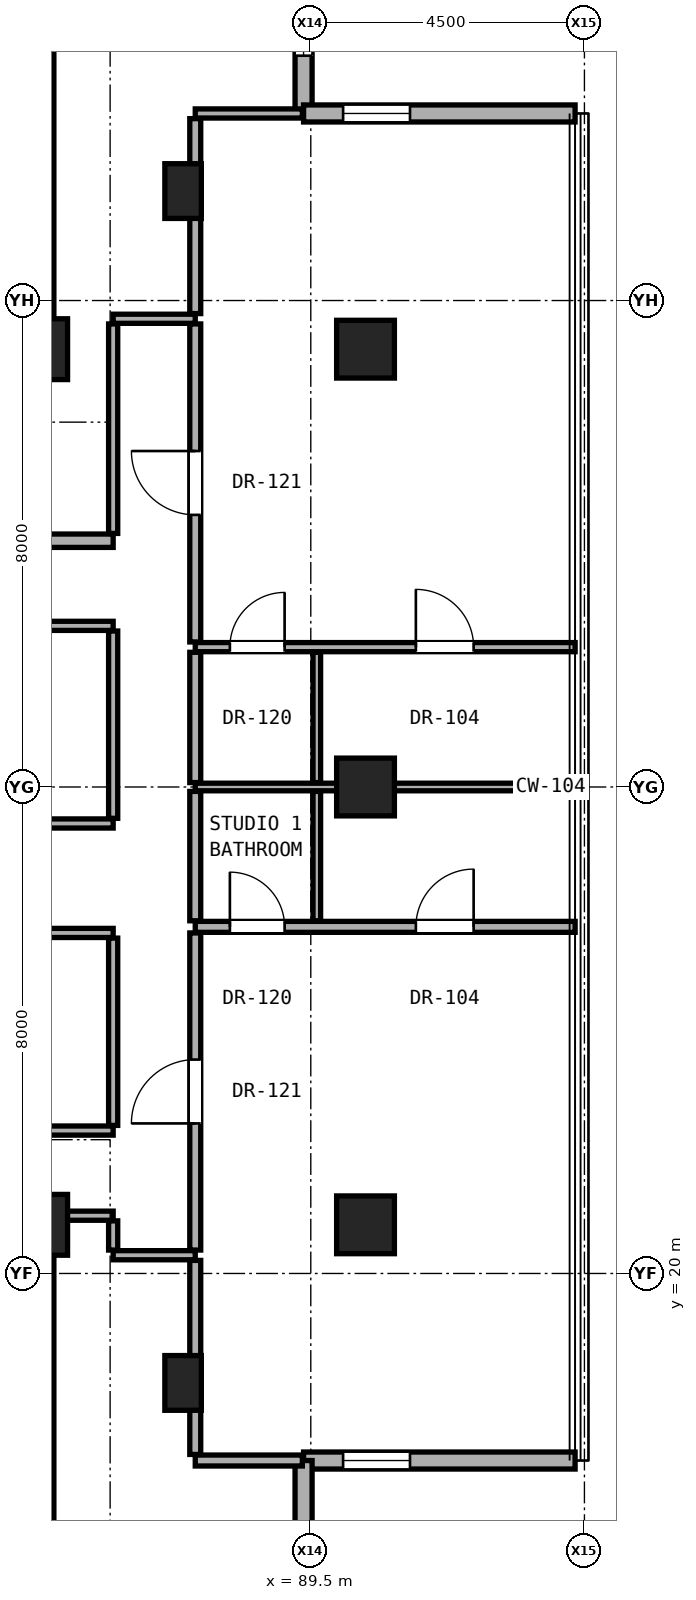
"""IFC4 building model, lengths in metres.
Left out: names, types, materials, properties, quantities, classifications, styles, units other than length and angle.
Written with IfcOpenShell. Run it as: python <this file> out.ifc"""

import sys

from ifc_helpers import new_model, si_unit, direction, frame, frame_2d, origin, origin_2d, place, context, subcontext, project, spatial, rectangle, hollow_rectangle, extrude, element, fill, save


model = new_model("IFC4")
c1 = context("Model", 3, precision=1e-05, world=origin(), true_north=direction((0.0, 1.0)))
c2 = subcontext(c1, "Body", "Model", "MODEL_VIEW")
j1 = project(units=[si_unit("LENGTHUNIT", "METRE"), si_unit("PLANEANGLEUNIT", "RADIAN")], contexts=[c1])
p1 = place(None, origin())
s1 = spatial("IfcSite", under=j1, at=p1, CompositionType="ELEMENT")
p2 = place(p1, origin())
s2 = spatial("IfcBuilding", under=s1, at=p2, CompositionType="ELEMENT")
p3 = place(p2, frame((0.0, 0.0, 164.15)))
s3 = spatial("IfcBuildingStorey", under=s2, at=p3, CompositionType="ELEMENT", Elevation=164.15)
for number, where, z_axis, x_axis in (
    (1, (85.0, 20.8, 0.0), (0.0, 0.0, 1.0), (1.0, 0.0, 0.0)),
    (2, (85.0, 35.2, 0.0), (0.0, 0.0, 1.0), (1.0, 0.0, 0.0)),
):
    element("IfcColumn", number, at=place(p3, frame(where, z_axis=z_axis, x_axis=x_axis)), inside=s3, PredefinedType="COLUMN", context=c2, shape_type="SweptSolid", body=[
        extrude(rectangle(XDim=1.0, YDim=1.0, at=origin_2d()), origin(), (0.0, 0.0, 1.0), 3.25),
    ])
for number, where, z_axis, x_axis in (
    (3, (90.4, 20.8, 0.0), (0.0, 0.0, 1.0), (1.0, 0.0, 0.0)),
    (4, (90.4, 28.0, 0.0), (0.0, 0.0, 1.0), (1.0, 0.0, 0.0)),
    (5, (90.4, 35.2, 0.0), (0.0, 0.0, 1.0), (1.0, 0.0, 0.0)),
):
    element("IfcColumn", number, at=place(p3, frame(where, z_axis=z_axis, x_axis=x_axis)), inside=s3, PredefinedType="COLUMN", context=c2, shape_type="SweptSolid", body=[
        extrude(hollow_rectangle(XDim=0.95, YDim=0.95, WallThickness=0.05, at=origin_2d()), origin(), (0.0, 0.0, 1.0), 3.25),
    ])
for number, where, z_axis, x_axis in (
    (6, (87.4, 18.2, 0.0), (0.0, 0.0, 1.0), (1.0, 0.0, 0.0)),
    (7, (87.4, 37.8, 0.0), (0.0, 0.0, 1.0), (1.0, 0.0, 0.0)),
):
    element("IfcColumn", number, at=place(p3, frame(where, z_axis=z_axis, x_axis=x_axis)), inside=s3, PredefinedType="PILASTER", context=c2, shape_type="SweptSolid", body=[
        extrude(rectangle(XDim=0.6, YDim=0.9, at=origin_2d()), origin(), (0.0, 0.0, 1.0), 3.25),
    ])
for number, where, z_axis, x_axis in (
    (8, (85.0, 35.2, 0.0), (0.0, 0.0, 1.0), (0.0, 1.0, 0.0)),
    (9, (85.0, 15.2, 0.0), (0.0, 0.0, 1.0), (0.0, 1.0, 0.0)),
):
    element("IfcWall", number, at=place(p3, frame(where, z_axis=z_axis, x_axis=x_axis)), inside=s3, PredefinedType="SHEAR", context=c2, shape_type="SweptSolid", body=[
        extrude(rectangle(XDim=5.6, YDim=0.55, at=frame_2d((2.8, 0.0))), origin(), (0.0, 0.0, 1.0), 3.05),
    ])
p4 = place(p3, frame((89.381, 39.076, 0.0), z_axis=(0.0, 0.0, 1.0), x_axis=(0.0, 1.0, 0.0)))
e10 = element("IfcWall", 10, at=p4, inside=s3, PredefinedType="SOLIDWALL", context=c2, shape_type="SweptSolid", body=[
    extrude(rectangle(XDim=4.465, YDim=0.28, at=frame_2d((2.233, 0.0))), origin(), (0.0, 0.0, 1.0), 3.03),
])
p5 = place(p4, frame((0.95, 0.0, 0.85)))
e11 = element("IfcOpeningElement", 11, at=p5, cuts=e10, PredefinedType="OPENING", context=c2, shape_type="SweptSolid", body=[
    extrude(rectangle(XDim=1.1, YDim=2.0, at=frame_2d((0.55, 1.0))), frame((0.0, 0.15, 0.0), z_axis=(0.0, -1.0, 0.0), x_axis=(1.0, 0.0, 0.0)), (0.0, 0.0, 1.0), 0.3),
])
p6 = place(p3, frame((89.381, 16.924, 0.0), z_axis=(0.0, 0.0, 1.0), x_axis=(1.0, 0.0, 0.0)))
e12 = element("IfcWall", 12, at=p6, inside=s3, PredefinedType="SOLIDWALL", context=c2, shape_type="SweptSolid", body=[
    extrude(rectangle(XDim=4.465, YDim=0.28, at=frame_2d((2.232, 0.0))), origin(), (0.0, 0.0, 1.0), 3.03),
])
p7 = place(p6, frame((0.65, 0.0, 0.85)))
e13 = element("IfcOpeningElement", 13, at=p7, cuts=e12, PredefinedType="OPENING", context=c2, shape_type="SweptSolid", body=[
    extrude(rectangle(XDim=1.1, YDim=2.0, at=frame_2d((0.55, 1.0))), frame((0.0, 0.15, 0.0), z_axis=(0.0, -1.0, 0.0), x_axis=(1.0, 0.0, 0.0)), (0.0, 0.0, 1.0), 0.3),
])
p8 = place(p3, frame((89.381, 12.458, 0.0), z_axis=(0.0, 0.0, 1.0), x_axis=(0.0, 1.0, 0.0)))
e14 = element("IfcWall", 14, at=p8, inside=s3, PredefinedType="SOLIDWALL", context=c2, shape_type="SweptSolid", body=[
    extrude(rectangle(XDim=4.465, YDim=0.28, at=frame_2d((2.233, 0.0))), origin(), (0.0, 0.0, 1.0), 3.03),
])
p9 = place(p3, frame((93.846, 39.076, 0.0), z_axis=(0.0, 0.0, 1.0), x_axis=(-1.0, 0.0, 0.0)))
e15 = element("IfcWall", 15, at=p9, inside=s3, PredefinedType="SOLIDWALL", context=c2, shape_type="SweptSolid", body=[
    extrude(rectangle(XDim=4.465, YDim=0.28, at=frame_2d((2.232, 0.0))), origin(), (0.0, 0.0, 1.0), 3.03),
])
p10 = place(p9, frame((2.715, 0.0, 0.85)))
e16 = element("IfcOpeningElement", 16, at=p10, cuts=e15, PredefinedType="OPENING", context=c2, shape_type="SweptSolid", body=[
    extrude(rectangle(XDim=1.1, YDim=2.0, at=frame_2d((0.55, 1.0))), frame((0.0, 0.15, 0.0), z_axis=(0.0, -1.0, 0.0), x_axis=(1.0, 0.0, 0.0)), (0.0, 0.0, 1.0), 0.3),
])
p11 = place(p3, frame((87.6, 16.924, 0.0), z_axis=(0.0, 0.0, 1.0), x_axis=(1.0, 0.0, 0.0)))
e17 = element("IfcWall", 17, at=p11, inside=s3, PredefinedType="PARTITIONING", context=c2, shape_type="SweptSolid", body=[
    extrude(rectangle(XDim=1.761, YDim=0.18, at=frame_2d((0.881, 0.0))), origin(), (0.0, 0.0, 1.0), 3.05),
])
p12 = place(p3, frame((86.25, 20.3, 0.0), z_axis=(0.0, 0.0, 1.0), x_axis=(1.0, 0.0, 0.0)))
e18 = element("IfcWall", 18, at=p12, inside=s3, PredefinedType="PARTITIONING", context=c2, shape_type="SweptSolid", body=[
    extrude(rectangle(XDim=1.35, YDim=0.15, at=frame_2d((0.675, 0.0))), origin(), (0.0, 0.0, 1.0), 3.05),
])
p13 = place(p3, frame((85.27, 20.95, 0.0), z_axis=(0.0, 0.0, 1.0), x_axis=(1.0, 0.0, 0.0)))
e19 = element("IfcWall", 19, at=p13, inside=s3, PredefinedType="PARTITIONING", context=c2, shape_type="SweptSolid", body=[
    extrude(rectangle(XDim=0.98, YDim=0.15, at=frame_2d((0.49, 0.0))), origin(), (0.0, 0.0, 1.0), 2.442),
])
p14 = place(p3, frame((78.64, 22.35, 0.0), z_axis=(0.0, 0.0, 1.0), x_axis=(1.0, 0.0, 0.0)))
e20 = element("IfcWall", 20, at=p14, inside=s3, PredefinedType="PARTITIONING", context=c2, shape_type="SweptSolid", body=[
    extrude(rectangle(XDim=7.61, YDim=0.15, at=frame_2d((3.805, 0.0))), origin(), (0.0, 0.0, 1.0), 2.186),
])
p15 = place(p14, frame((3.33, 0.0, 0.0)))
e21 = element("IfcOpeningElement", 21, at=p15, cuts=e20, PredefinedType="OPENING", context=c2, shape_type="SweptSolid", body=[
    extrude(rectangle(XDim=0.95, YDim=2.15, at=frame_2d((0.475, 1.075))), frame((0.0, 0.085, 0.0), z_axis=(0.0, -1.0, 0.0), x_axis=(1.0, 0.0, 0.0)), (0.0, 0.0, 1.0), 0.17),
])
p16 = place(p3, frame((78.6, 25.6, 0.0), z_axis=(0.0, 0.0, 1.0), x_axis=(1.0, 0.0, 0.0)))
e22 = element("IfcWall", 22, at=p16, inside=s3, PredefinedType="PARTITIONING", context=c2, shape_type="SweptSolid", body=[
    extrude(rectangle(XDim=7.65, YDim=0.15, at=frame_2d((3.825, 0.0))), origin(), (0.0, 0.0, 1.0), 2.186),
])
p17 = place(p3, frame((87.6, 25.7, 0.0), z_axis=(0.0, 0.0, 1.0), x_axis=(1.0, 0.0, 0.0)))
e23 = element("IfcWall", 23, at=p17, inside=s3, PredefinedType="PARTITIONING", context=c2, shape_type="SweptSolid", body=[
    extrude(rectangle(XDim=6.247, YDim=0.18, at=frame_2d((3.124, 0.0))), origin(), (0.0, 0.0, 1.0), 2.269),
])
p18 = place(p17, frame((3.628, 0.0, 0.0)))
e24 = element("IfcOpeningElement", 24, at=p18, cuts=e23, PredefinedType="OPENING", context=c2, shape_type="SweptSolid", body=[
    extrude(rectangle(XDim=0.95, YDim=2.15, at=frame_2d((0.475, 1.075))), frame((0.0, 0.1, 0.0), z_axis=(0.0, -1.0, 0.0), x_axis=(1.0, 0.0, 0.0)), (0.0, 0.0, 1.0), 0.2),
])
p19 = place(p17, frame((0.57, 0.0, 0.0)))
e25 = element("IfcOpeningElement", 25, at=p19, cuts=e23, PredefinedType="OPENING", context=c2, shape_type="SweptSolid", body=[
    extrude(rectangle(XDim=0.9, YDim=2.1, at=frame_2d((0.45, 1.05))), frame((0.0, 0.1, 0.0), z_axis=(0.0, -1.0, 0.0), x_axis=(1.0, 0.0, 0.0)), (0.0, 0.0, 1.0), 0.2),
])
p20 = place(p3, frame((78.6, 27.4, 0.0), z_axis=(0.0, 0.0, 1.0), x_axis=(1.0, 0.0, 0.0)))
e26 = element("IfcWall", 26, at=p20, inside=s3, PredefinedType="PARTITIONING", context=c2, shape_type="SweptSolid", body=[
    extrude(rectangle(XDim=7.65, YDim=0.15, at=frame_2d((3.825, 0.0))), origin(), (0.0, 0.0, 1.0), 2.186),
])
p21 = place(p3, frame((87.6, 28.0, 0.0), z_axis=(0.0, 0.0, 1.0), x_axis=(1.0, 0.0, 0.0)))
e27 = element("IfcWall", 27, at=p21, inside=s3, PredefinedType="PARTITIONING", context=c2, shape_type="SweptSolid", body=[
    extrude(rectangle(XDim=6.247, YDim=0.125, at=frame_2d((3.124, 0.0))), origin(), (0.0, 0.0, 1.0), 2.269),
])
p22 = place(p3, frame((87.6, 30.3, 0.0), z_axis=(0.0, 0.0, 1.0), x_axis=(1.0, 0.0, 0.0)))
e28 = element("IfcWall", 28, at=p22, inside=s3, PredefinedType="PARTITIONING", context=c2, shape_type="SweptSolid", body=[
    extrude(rectangle(XDim=6.247, YDim=0.15, at=frame_2d((3.124, 0.0))), origin(), (0.0, 0.0, 1.0), 2.269),
])
p23 = place(p22, frame((3.628, 0.0, 0.0)))
e29 = element("IfcOpeningElement", 29, at=p23, cuts=e28, PredefinedType="OPENING", context=c2, shape_type="SweptSolid", body=[
    extrude(rectangle(XDim=0.95, YDim=2.15, at=frame_2d((0.475, 1.075))), frame((0.0, 0.085, 0.0), z_axis=(0.0, -1.0, 0.0), x_axis=(1.0, 0.0, 0.0)), (0.0, 0.0, 1.0), 0.17),
])
p24 = place(p22, frame((0.57, 0.0, 0.0)))
e30 = element("IfcOpeningElement", 30, at=p24, cuts=e28, PredefinedType="OPENING", context=c2, shape_type="SweptSolid", body=[
    extrude(rectangle(XDim=0.9, YDim=2.1, at=frame_2d((0.45, 1.05))), frame((0.0, 0.085, 0.0), z_axis=(0.0, -1.0, 0.0), x_axis=(1.0, 0.0, 0.0)), (0.0, 0.0, 1.0), 0.17),
])
p25 = place(p3, frame((78.64, 30.65, 0.0), z_axis=(0.0, 0.0, 1.0), x_axis=(1.0, 0.0, 0.0)))
e31 = element("IfcWall", 31, at=p25, inside=s3, PredefinedType="PARTITIONING", context=c2, shape_type="SweptSolid", body=[
    extrude(rectangle(XDim=7.61, YDim=0.15, at=frame_2d((3.805, 0.0))), origin(), (0.0, 0.0, 1.0), 2.186),
])
p26 = place(p25, frame((3.33, 0.0, 0.0)))
e32 = element("IfcOpeningElement", 32, at=p26, cuts=e31, PredefinedType="OPENING", context=c2, shape_type="SweptSolid", body=[
    extrude(rectangle(XDim=0.95, YDim=2.15, at=frame_2d((0.475, 1.075))), frame((0.0, 0.085, 0.0), z_axis=(0.0, -1.0, 0.0), x_axis=(1.0, 0.0, 0.0)), (0.0, 0.0, 1.0), 0.17),
])
p27 = place(p3, frame((71.55, 32.05, 0.0), z_axis=(0.0, 0.0, 1.0), x_axis=(1.0, 0.0, 0.0)))
e33 = element("IfcWall", 33, at=p27, inside=s3, PredefinedType="SOLIDWALL", context=c2, shape_type="SweptSolid", body=[
    extrude(rectangle(XDim=14.7, YDim=0.22, at=frame_2d((7.35, 0.0))), origin(), (0.0, 0.0, 1.0), 2.186),
])
p28 = place(p27, frame((6.065, 0.0, 0.0)))
e34 = element("IfcOpeningElement", 34, at=p28, cuts=e33, PredefinedType="OPENING", context=c2, shape_type="SweptSolid", body=[
    extrude(rectangle(XDim=0.85, YDim=2.01, at=frame_2d((0.425, 1.005))), frame((0.0, 0.12, 0.0), z_axis=(0.0, -1.0, 0.0), x_axis=(1.0, 0.0, 0.0)), (0.0, 0.0, 1.0), 0.24),
])
p29 = place(p27, frame((10.535, 0.0, 0.0)))
e35 = element("IfcOpeningElement", 35, at=p29, cuts=e33, PredefinedType="OPENING", context=c2, shape_type="SweptSolid", body=[
    extrude(rectangle(XDim=0.95, YDim=2.15, at=frame_2d((0.475, 1.075))), frame((0.0, 0.12, 0.0), z_axis=(0.0, -1.0, 0.0), x_axis=(1.0, 0.0, 0.0)), (0.0, 0.0, 1.0), 0.24),
])
p30 = place(p27, frame((0.7, 0.0, 0.0)))
e36 = element("IfcOpeningElement", 36, at=p30, cuts=e33, PredefinedType="OPENING", context=c2, shape_type="SweptSolid", body=[
    extrude(rectangle(XDim=0.85, YDim=2.01, at=frame_2d((0.425, 1.005))), frame((0.0, 0.12, 0.0), z_axis=(0.0, -1.0, 0.0), x_axis=(1.0, 0.0, 0.0)), (0.0, 0.0, 1.0), 0.24),
])
p31 = place(p27, frame((2.55, 0.0, 0.0)))
e37 = element("IfcOpeningElement", 37, at=p31, cuts=e33, PredefinedType="OPENING", context=c2, shape_type="SweptSolid", body=[
    extrude(rectangle(XDim=0.85, YDim=2.01, at=frame_2d((0.425, 1.005))), frame((0.0, 0.12, 0.0), z_axis=(0.0, -1.0, 0.0), x_axis=(1.0, 0.0, 0.0)), (0.0, 0.0, 1.0), 0.24),
])
p32 = place(p3, frame((86.25, 35.7, 0.0), z_axis=(0.0, 0.0, 1.0), x_axis=(1.0, 0.0, 0.0)))
e38 = element("IfcWall", 38, at=p32, inside=s3, PredefinedType="PARTITIONING", context=c2, shape_type="SweptSolid", body=[
    extrude(rectangle(XDim=1.35, YDim=0.15, at=frame_2d((0.675, 0.0))), origin(), (0.0, 0.0, 1.0), 3.05),
])
p33 = place(p3, frame((87.6, 39.076, 0.0), z_axis=(0.0, 0.0, 1.0), x_axis=(1.0, 0.0, 0.0)))
e39 = element("IfcWall", 39, at=p33, inside=s3, PredefinedType="PARTITIONING", context=c2, shape_type="SweptSolid", body=[
    extrude(rectangle(XDim=1.761, YDim=0.15, at=frame_2d((0.881, 0.0))), origin(), (0.0, 0.0, 1.0), 3.05),
])
p34 = place(p3, frame((86.25, 20.385, 0.0), z_axis=(0.0, 0.0, 1.0), x_axis=(0.0, 1.0, 0.0)))
e40 = element("IfcWall", 40, at=p34, inside=s3, PredefinedType="PARTITIONING", context=c2, shape_type="SweptSolid", body=[
    extrude(rectangle(XDim=0.48, YDim=0.15, at=frame_2d((0.24, 0.0))), origin(), (0.0, 0.0, 1.0), 2.442),
])
p35 = place(p3, frame((86.25, 22.435, 0.0), z_axis=(0.0, 0.0, 1.0), x_axis=(0.0, 1.0, 0.0)))
e41 = element("IfcWall", 41, at=p35, inside=s3, PredefinedType="PARTITIONING", context=c2, shape_type="SweptSolid", body=[
    extrude(rectangle(XDim=3.08, YDim=0.15, at=frame_2d((1.54, 0.0))), origin(), (0.0, 0.0, 1.0), 3.05),
])
p36 = place(p3, frame((86.25, 27.485, 0.0), z_axis=(0.0, 0.0, 1.0), x_axis=(0.0, 1.0, 0.0)))
e42 = element("IfcWall", 42, at=p36, inside=s3, PredefinedType="PARTITIONING", context=c2, shape_type="SweptSolid", body=[
    extrude(rectangle(XDim=3.08, YDim=0.15, at=frame_2d((1.54, 0.0))), origin(), (0.0, 0.0, 1.0), 2.346),
])
p37 = place(p3, frame((86.25, 32.17, 0.0), z_axis=(0.0, 0.0, 1.0), x_axis=(0.0, 1.0, 0.0)))
e43 = element("IfcWall", 43, at=p37, inside=s3, PredefinedType="PARTITIONING", context=c2, shape_type="SweptSolid", body=[
    extrude(rectangle(XDim=3.445, YDim=0.15, at=frame_2d((1.723, 0.0))), origin(), (0.0, 0.0, 1.0), 2.442),
])
p38 = place(p3, frame((87.6, 17.024, 0.0), z_axis=(0.0, 0.0, 1.0), x_axis=(0.0, 1.0, 0.0)))
e44 = element("IfcWall", 44, at=p38, inside=s3, PredefinedType="PARTITIONING", context=c2, shape_type="SweptSolid", body=[
    extrude(rectangle(XDim=3.191, YDim=0.18, at=frame_2d((1.596, 0.0))), origin(), (0.0, 0.0, 1.0), 2.493),
])
p39 = place(p3, frame((87.6, 20.385, 0.0), z_axis=(0.0, 0.0, 1.0), x_axis=(0.0, 1.0, 0.0)))
e45 = element("IfcWall", 45, at=p39, inside=s3, PredefinedType="PARTITIONING", context=c2, shape_type="SweptSolid", body=[
    extrude(rectangle(XDim=5.215, YDim=0.18, at=frame_2d((2.607, 0.0))), origin(), (0.0, 0.0, 1.0), 2.442),
])
p40 = place(p39, frame((2.083, 0.0, 0.0)))
e46 = element("IfcOpeningElement", 46, at=p40, cuts=e45, PredefinedType="OPENING", context=c2, shape_type="SweptSolid", body=[
    extrude(rectangle(XDim=1.05, YDim=2.2, at=frame_2d((0.525, 1.1))), frame((0.0, 0.1, 0.0), z_axis=(0.0, -1.0, 0.0), x_axis=(1.0, 0.0, 0.0)), (0.0, 0.0, 1.0), 0.2),
])
p41 = place(p3, frame((87.6, 25.8, 0.0), z_axis=(0.0, 0.0, 1.0), x_axis=(0.0, 1.0, 0.0)))
e47 = element("IfcWall", 47, at=p41, inside=s3, PredefinedType="PARTITIONING", context=c2, shape_type="SweptSolid", body=[
    extrude(rectangle(XDim=2.127, YDim=0.18, at=frame_2d((1.064, 0.0))), origin(), (0.0, 0.0, 1.0), 2.346),
])
p42 = place(p3, frame((87.6, 28.073, 0.0), z_axis=(0.0, 0.0, 1.0), x_axis=(0.0, 1.0, 0.0)))
e48 = element("IfcWall", 48, at=p42, inside=s3, PredefinedType="PARTITIONING", context=c2, shape_type="SweptSolid", body=[
    extrude(rectangle(XDim=2.143, YDim=0.18, at=frame_2d((1.071, 0.0))), origin(), (0.0, 0.0, 1.0), 2.346),
])
p43 = place(p3, frame((87.6, 30.385, 0.0), z_axis=(0.0, 0.0, 1.0), x_axis=(0.0, 1.0, 0.0)))
e49 = element("IfcWall", 49, at=p43, inside=s3, PredefinedType="PARTITIONING", context=c2, shape_type="SweptSolid", body=[
    extrude(rectangle(XDim=5.23, YDim=0.18, at=frame_2d((2.615, 0.0))), origin(), (0.0, 0.0, 1.0), 2.442),
])
p44 = place(p43, frame((2.09, 0.0, 0.0)))
e50 = element("IfcOpeningElement", 50, at=p44, cuts=e49, PredefinedType="OPENING", context=c2, shape_type="SweptSolid", body=[
    extrude(rectangle(XDim=1.05, YDim=2.2, at=frame_2d((0.525, 1.1))), frame((0.0, 0.1, 0.0), z_axis=(0.0, -1.0, 0.0), x_axis=(1.0, 0.0, 0.0)), (0.0, 0.0, 1.0), 0.2),
])
p45 = place(p3, frame((87.6, 35.785, 0.0), z_axis=(0.0, 0.0, 1.0), x_axis=(0.0, 1.0, 0.0)))
e51 = element("IfcWall", 51, at=p45, inside=s3, PredefinedType="PARTITIONING", context=c2, shape_type="SweptSolid", body=[
    extrude(rectangle(XDim=3.206, YDim=0.18, at=frame_2d((1.603, 0.0))), origin(), (0.0, 0.0, 1.0), 2.493),
])
p46 = place(p3, frame((89.599, 25.8, 0.0), z_axis=(0.0, 0.0, 1.0), x_axis=(0.0, 1.0, 0.0)))
e52 = element("IfcWall", 52, at=p46, inside=s3, PredefinedType="PARTITIONING", context=c2, shape_type="SweptSolid", body=[
    extrude(rectangle(XDim=2.127, YDim=0.125, at=frame_2d((1.064, 0.0))), origin(), (0.0, 0.0, 1.0), 2.346),
])
p47 = place(p3, frame((89.599, 28.073, 0.0), z_axis=(0.0, 0.0, 1.0), x_axis=(0.0, 1.0, 0.0)))
e53 = element("IfcWall", 53, at=p47, inside=s3, PredefinedType="PARTITIONING", context=c2, shape_type="SweptSolid", body=[
    extrude(rectangle(XDim=2.143, YDim=0.125, at=frame_2d((1.071, 0.0))), origin(), (0.0, 0.0, 1.0), 2.346),
])
p48 = place(p5, origin())
e54 = element("IfcWindow", 54, at=p48, inside=s3, PartitioningType="SINGLE_PANEL", PredefinedType="WINDOW", context=c2, shape_type="SweptSolid", body=[
    extrude(rectangle(XDim=1.1, YDim=2.0, at=frame_2d((0.55, 1.0))), frame((0.0, 0.03, 0.0), z_axis=(0.0, -1.0, 0.0), x_axis=(1.0, 0.0, 0.0)), (0.0, 0.0, 1.0), 0.06),
])
fill(e11, e54)
p49 = place(p7, origin())
e55 = element("IfcWindow", 55, at=p49, inside=s3, PartitioningType="SINGLE_PANEL", PredefinedType="WINDOW", context=c2, shape_type="SweptSolid", body=[
    extrude(rectangle(XDim=1.1, YDim=2.0, at=frame_2d((0.55, 1.0))), frame((0.0, 0.03, 0.0), z_axis=(0.0, -1.0, 0.0), x_axis=(1.0, 0.0, 0.0)), (0.0, 0.0, 1.0), 0.06),
])
fill(e13, e55)
p50 = place(p10, origin())
e56 = element("IfcWindow", 56, at=p50, inside=s3, PartitioningType="SINGLE_PANEL", PredefinedType="WINDOW", context=c2, shape_type="SweptSolid", body=[
    extrude(rectangle(XDim=1.1, YDim=2.0, at=frame_2d((0.55, 1.0))), frame((0.0, 0.03, 0.0), z_axis=(0.0, -1.0, 0.0), x_axis=(1.0, 0.0, 0.0)), (0.0, 0.0, 1.0), 0.06),
])
fill(e16, e56)
p51 = place(p40, origin())
e57 = element("IfcDoor", 57, at=p51, inside=s3, OperationType="SINGLE_SWING_LEFT", PredefinedType="DOOR", context=c2, shape_type="SweptSolid", body=[
    extrude(rectangle(XDim=1.05, YDim=2.2, at=frame_2d((0.525, 1.1))), frame((0.0, 0.025, 0.0), z_axis=(0.0, -1.0, 0.0), x_axis=(1.0, 0.0, 0.0)), (0.0, 0.0, 1.0), 0.05),
])
fill(e46, e57)
p52 = place(p18, origin())
e58 = element("IfcDoor", 58, at=p52, inside=s3, OperationType="SINGLE_SWING_RIGHT", PredefinedType="DOOR", context=c2, shape_type="SweptSolid", body=[
    extrude(rectangle(XDim=0.95, YDim=2.15, at=frame_2d((0.475, 1.075))), frame((0.0, 0.025, 0.0), z_axis=(0.0, -1.0, 0.0), x_axis=(1.0, 0.0, 0.0)), (0.0, 0.0, 1.0), 0.05),
])
fill(e24, e58)
p53 = place(p19, origin())
e59 = element("IfcDoor", 59, at=p53, inside=s3, OperationType="SINGLE_SWING_LEFT", PredefinedType="DOOR", context=c2, shape_type="SweptSolid", body=[
    extrude(rectangle(XDim=0.9, YDim=2.1, at=frame_2d((0.45, 1.05))), frame((0.0, 0.025, 0.0), z_axis=(0.0, -1.0, 0.0), x_axis=(1.0, 0.0, 0.0)), (0.0, 0.0, 1.0), 0.05),
])
fill(e25, e59)
p54 = place(p44, origin())
e60 = element("IfcDoor", 60, at=p54, inside=s3, OperationType="SINGLE_SWING_RIGHT", PredefinedType="DOOR", context=c2, shape_type="SweptSolid", body=[
    extrude(rectangle(XDim=1.05, YDim=2.2, at=frame_2d((0.525, 1.1))), frame((0.0, 0.025, 0.0), z_axis=(0.0, -1.0, 0.0), x_axis=(1.0, 0.0, 0.0)), (0.0, 0.0, 1.0), 0.05),
])
fill(e50, e60)
p55 = place(p23, origin())
e61 = element("IfcDoor", 61, at=p55, inside=s3, OperationType="SINGLE_SWING_LEFT", PredefinedType="DOOR", context=c2, shape_type="SweptSolid", body=[
    extrude(rectangle(XDim=0.95, YDim=2.15, at=frame_2d((0.475, 1.075))), frame((0.0, 0.025, 0.0), z_axis=(0.0, -1.0, 0.0), x_axis=(1.0, 0.0, 0.0)), (0.0, 0.0, 1.0), 0.05),
])
fill(e29, e61)
p56 = place(p24, origin())
e62 = element("IfcDoor", 62, at=p56, inside=s3, OperationType="SINGLE_SWING_RIGHT", PredefinedType="DOOR", context=c2, shape_type="SweptSolid", body=[
    extrude(rectangle(XDim=0.9, YDim=2.1, at=frame_2d((0.45, 1.05))), frame((0.0, 0.025, 0.0), z_axis=(0.0, -1.0, 0.0), x_axis=(1.0, 0.0, 0.0)), (0.0, 0.0, 1.0), 0.05),
])
fill(e30, e62)
save(model, sys.argv[1])
